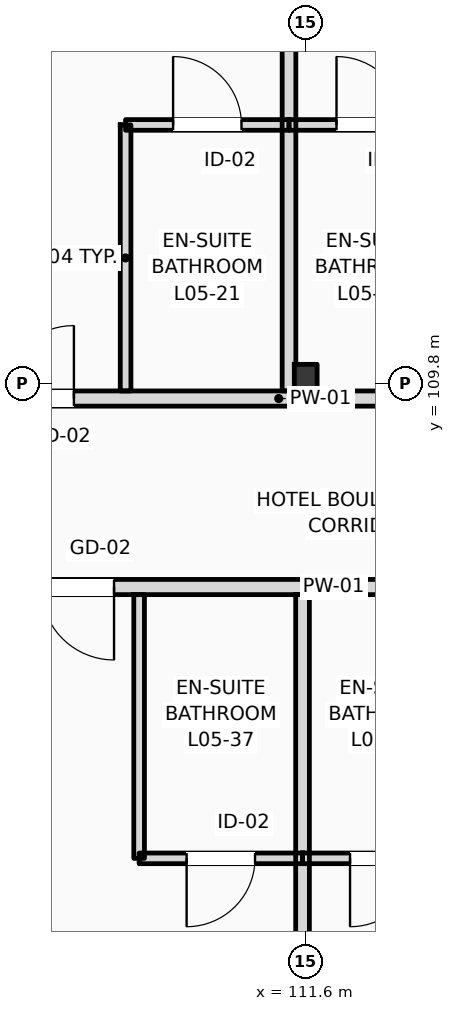
"""IFC4 building model, lengths in metres.
Left out: names, types, materials, properties, quantities, classifications, styles, units other than length and angle.
Written with IfcOpenShell. Run it as: python <this file> out.ifc"""

import sys

from ifc_helpers import new_model, si_unit, direction, frame, frame_2d, origin, origin_2d, place, context, subcontext, project, spatial, rectangle, i_section, extrude, element, fill, save


model = new_model("IFC4")
c1 = context("Model", 3, precision=1e-05, world=origin(), true_north=direction((0.0, 1.0)))
c2 = subcontext(c1, "Body", "Model", "MODEL_VIEW")
j1 = project(units=[si_unit("LENGTHUNIT", "METRE"), si_unit("PLANEANGLEUNIT", "RADIAN")], contexts=[c1])
p1 = place(None, origin())
s1 = spatial("IfcSite", under=j1, at=p1, CompositionType="ELEMENT")
p2 = place(p1, origin())
s2 = spatial("IfcBuilding", under=s1, at=p2, CompositionType="ELEMENT")
p3 = place(p2, frame((0.0, 0.0, 24.6)))
s3 = spatial("IfcBuildingStorey", under=s2, at=p3, CompositionType="ELEMENT", Elevation=24.6)
p4 = place(p3, frame((111.6, 109.8, 0.0), z_axis=(0.0, 0.0, 1.0), x_axis=(1.0, 0.0, 0.0)))
e1 = element("IfcColumn", 1, at=p4, inside=s3, PredefinedType="COLUMN", context=c2, shape_type="SweptSolid", body=[
    extrude(i_section(OverallWidth=0.3, OverallDepth=0.5, WebThickness=0.014, FlangeThickness=0.028, FilletRadius=0.027, at=origin_2d()), origin(), (0.0, 0.0, 1.0), 3.6),
])
p5 = place(p3, frame((10.65, 109.6, 0.0), z_axis=(0.0, 0.0, 1.0), x_axis=(1.0, 0.0, 0.0)))
e2 = element("IfcWall", 2, at=p5, inside=s3, PredefinedType="PARTITIONING", context=c2, shape_type="SweptSolid", body=[
    extrude(rectangle(XDim=109.21, YDim=0.2, at=frame_2d((54.605, 0.0))), origin(), (0.0, 0.0, 1.0), 2.78),
])
p6 = place(p5, frame((12.705, 0.0, 0.0)))
e3 = element("IfcOpeningElement", 3, at=p6, cuts=e2, PredefinedType="OPENING", context=c2, shape_type="SweptSolid", body=[
    extrude(rectangle(XDim=1.02, YDim=2.2, at=frame_2d((0.51, 1.1))), frame((0.0, 0.11, 0.0), z_axis=(0.0, -1.0, 0.0), x_axis=(1.0, 0.0, 0.0)), (0.0, 0.0, 1.0), 0.22),
])
p7 = place(p5, frame((19.26, 0.0, 0.0)))
e4 = element("IfcOpeningElement", 4, at=p7, cuts=e2, PredefinedType="OPENING", context=c2, shape_type="SweptSolid", body=[
    extrude(rectangle(XDim=1.02, YDim=2.2, at=frame_2d((0.51, 1.1))), frame((0.0, 0.11, 0.0), z_axis=(0.0, -1.0, 0.0), x_axis=(1.0, 0.0, 0.0)), (0.0, 0.0, 1.0), 0.22),
])
p8 = place(p5, frame((23.71, 0.0, 0.0)))
e5 = element("IfcOpeningElement", 5, at=p8, cuts=e2, PredefinedType="OPENING", context=c2, shape_type="SweptSolid", body=[
    extrude(rectangle(XDim=1.02, YDim=2.2, at=frame_2d((0.51, 1.1))), frame((0.0, 0.11, 0.0), z_axis=(0.0, -1.0, 0.0), x_axis=(1.0, 0.0, 0.0)), (0.0, 0.0, 1.0), 0.22),
])
p9 = place(p5, frame((27.66, 0.0, 0.0)))
e6 = element("IfcOpeningElement", 6, at=p9, cuts=e2, PredefinedType="OPENING", context=c2, shape_type="SweptSolid", body=[
    extrude(rectangle(XDim=1.02, YDim=2.2, at=frame_2d((0.51, 1.1))), frame((0.0, 0.11, 0.0), z_axis=(0.0, -1.0, 0.0), x_axis=(1.0, 0.0, 0.0)), (0.0, 0.0, 1.0), 0.22),
])
p10 = place(p5, frame((31.89, 0.0, 0.0)))
e7 = element("IfcOpeningElement", 7, at=p10, cuts=e2, PredefinedType="OPENING", context=c2, shape_type="SweptSolid", body=[
    extrude(rectangle(XDim=0.96, YDim=2.2, at=frame_2d((0.48, 1.1))), frame((0.0, 0.11, 0.0), z_axis=(0.0, -1.0, 0.0), x_axis=(1.0, 0.0, 0.0)), (0.0, 0.0, 1.0), 0.22),
])
p11 = place(p5, frame((33.94, 0.0, 0.0)))
e8 = element("IfcOpeningElement", 8, at=p11, cuts=e2, PredefinedType="OPENING", context=c2, shape_type="SweptSolid", body=[
    extrude(rectangle(XDim=0.96, YDim=2.2, at=frame_2d((0.48, 1.1))), frame((0.0, 0.11, 0.0), z_axis=(0.0, -1.0, 0.0), x_axis=(1.0, 0.0, 0.0)), (0.0, 0.0, 1.0), 0.22),
])
p12 = place(p5, frame((40.29, 0.0, 0.0)))
e9 = element("IfcOpeningElement", 9, at=p12, cuts=e2, PredefinedType="OPENING", context=c2, shape_type="SweptSolid", body=[
    extrude(rectangle(XDim=0.96, YDim=2.2, at=frame_2d((0.48, 1.1))), frame((0.0, 0.11, 0.0), z_axis=(0.0, -1.0, 0.0), x_axis=(1.0, 0.0, 0.0)), (0.0, 0.0, 1.0), 0.22),
])
p13 = place(p5, frame((42.34, 0.0, 0.0)))
e10 = element("IfcOpeningElement", 10, at=p13, cuts=e2, PredefinedType="OPENING", context=c2, shape_type="SweptSolid", body=[
    extrude(rectangle(XDim=0.96, YDim=2.2, at=frame_2d((0.48, 1.1))), frame((0.0, 0.11, 0.0), z_axis=(0.0, -1.0, 0.0), x_axis=(1.0, 0.0, 0.0)), (0.0, 0.0, 1.0), 0.22),
])
p14 = place(p5, frame((48.69, 0.0, 0.0)))
e11 = element("IfcOpeningElement", 11, at=p14, cuts=e2, PredefinedType="OPENING", context=c2, shape_type="SweptSolid", body=[
    extrude(rectangle(XDim=0.96, YDim=2.2, at=frame_2d((0.48, 1.1))), frame((0.0, 0.11, 0.0), z_axis=(0.0, -1.0, 0.0), x_axis=(1.0, 0.0, 0.0)), (0.0, 0.0, 1.0), 0.22),
])
p15 = place(p5, frame((50.74, 0.0, 0.0)))
e12 = element("IfcOpeningElement", 12, at=p15, cuts=e2, PredefinedType="OPENING", context=c2, shape_type="SweptSolid", body=[
    extrude(rectangle(XDim=0.96, YDim=2.2, at=frame_2d((0.48, 1.1))), frame((0.0, 0.11, 0.0), z_axis=(0.0, -1.0, 0.0), x_axis=(1.0, 0.0, 0.0)), (0.0, 0.0, 1.0), 0.22),
])
p16 = place(p5, frame((57.09, 0.0, 0.0)))
e13 = element("IfcOpeningElement", 13, at=p16, cuts=e2, PredefinedType="OPENING", context=c2, shape_type="SweptSolid", body=[
    extrude(rectangle(XDim=0.96, YDim=2.2, at=frame_2d((0.48, 1.1))), frame((0.0, 0.11, 0.0), z_axis=(0.0, -1.0, 0.0), x_axis=(1.0, 0.0, 0.0)), (0.0, 0.0, 1.0), 0.22),
])
p17 = place(p5, frame((59.14, 0.0, 0.0)))
e14 = element("IfcOpeningElement", 14, at=p17, cuts=e2, PredefinedType="OPENING", context=c2, shape_type="SweptSolid", body=[
    extrude(rectangle(XDim=0.96, YDim=2.2, at=frame_2d((0.48, 1.1))), frame((0.0, 0.11, 0.0), z_axis=(0.0, -1.0, 0.0), x_axis=(1.0, 0.0, 0.0)), (0.0, 0.0, 1.0), 0.22),
])
p18 = place(p5, frame((65.49, 0.0, 0.0)))
e15 = element("IfcOpeningElement", 15, at=p18, cuts=e2, PredefinedType="OPENING", context=c2, shape_type="SweptSolid", body=[
    extrude(rectangle(XDim=0.96, YDim=2.2, at=frame_2d((0.48, 1.1))), frame((0.0, 0.11, 0.0), z_axis=(0.0, -1.0, 0.0), x_axis=(1.0, 0.0, 0.0)), (0.0, 0.0, 1.0), 0.22),
])
p19 = place(p5, frame((67.54, 0.0, 0.0)))
e16 = element("IfcOpeningElement", 16, at=p19, cuts=e2, PredefinedType="OPENING", context=c2, shape_type="SweptSolid", body=[
    extrude(rectangle(XDim=0.96, YDim=2.2, at=frame_2d((0.48, 1.1))), frame((0.0, 0.11, 0.0), z_axis=(0.0, -1.0, 0.0), x_axis=(1.0, 0.0, 0.0)), (0.0, 0.0, 1.0), 0.22),
])
p20 = place(p5, frame((73.89, 0.0, 0.0)))
e17 = element("IfcOpeningElement", 17, at=p20, cuts=e2, PredefinedType="OPENING", context=c2, shape_type="SweptSolid", body=[
    extrude(rectangle(XDim=0.96, YDim=2.2, at=frame_2d((0.48, 1.1))), frame((0.0, 0.11, 0.0), z_axis=(0.0, -1.0, 0.0), x_axis=(1.0, 0.0, 0.0)), (0.0, 0.0, 1.0), 0.22),
])
p21 = place(p5, frame((78.09, 0.0, 0.0)))
e18 = element("IfcOpeningElement", 18, at=p21, cuts=e2, PredefinedType="OPENING", context=c2, shape_type="SweptSolid", body=[
    extrude(rectangle(XDim=0.96, YDim=2.2, at=frame_2d((0.48, 1.1))), frame((0.0, 0.11, 0.0), z_axis=(0.0, -1.0, 0.0), x_axis=(1.0, 0.0, 0.0)), (0.0, 0.0, 1.0), 0.22),
])
p22 = place(p5, frame((82.29, 0.0, 0.0)))
e19 = element("IfcOpeningElement", 19, at=p22, cuts=e2, PredefinedType="OPENING", context=c2, shape_type="SweptSolid", body=[
    extrude(rectangle(XDim=0.96, YDim=2.2, at=frame_2d((0.48, 1.1))), frame((0.0, 0.11, 0.0), z_axis=(0.0, -1.0, 0.0), x_axis=(1.0, 0.0, 0.0)), (0.0, 0.0, 1.0), 0.22),
])
p23 = place(p5, frame((86.49, 0.0, 0.0)))
e20 = element("IfcOpeningElement", 20, at=p23, cuts=e2, PredefinedType="OPENING", context=c2, shape_type="SweptSolid", body=[
    extrude(rectangle(XDim=0.96, YDim=2.2, at=frame_2d((0.48, 1.1))), frame((0.0, 0.11, 0.0), z_axis=(0.0, -1.0, 0.0), x_axis=(1.0, 0.0, 0.0)), (0.0, 0.0, 1.0), 0.22),
])
p24 = place(p5, frame((88.54, 0.0, 0.0)))
e21 = element("IfcOpeningElement", 21, at=p24, cuts=e2, PredefinedType="OPENING", context=c2, shape_type="SweptSolid", body=[
    extrude(rectangle(XDim=0.96, YDim=2.2, at=frame_2d((0.48, 1.1))), frame((0.0, 0.11, 0.0), z_axis=(0.0, -1.0, 0.0), x_axis=(1.0, 0.0, 0.0)), (0.0, 0.0, 1.0), 0.22),
])
p25 = place(p5, frame((94.89, 0.0, 0.0)))
e22 = element("IfcOpeningElement", 22, at=p25, cuts=e2, PredefinedType="OPENING", context=c2, shape_type="SweptSolid", body=[
    extrude(rectangle(XDim=0.96, YDim=2.2, at=frame_2d((0.48, 1.1))), frame((0.0, 0.11, 0.0), z_axis=(0.0, -1.0, 0.0), x_axis=(1.0, 0.0, 0.0)), (0.0, 0.0, 1.0), 0.22),
])
p26 = place(p5, frame((96.94, 0.0, 0.0)))
e23 = element("IfcOpeningElement", 23, at=p26, cuts=e2, PredefinedType="OPENING", context=c2, shape_type="SweptSolid", body=[
    extrude(rectangle(XDim=0.96, YDim=2.2, at=frame_2d((0.48, 1.1))), frame((0.0, 0.11, 0.0), z_axis=(0.0, -1.0, 0.0), x_axis=(1.0, 0.0, 0.0)), (0.0, 0.0, 1.0), 0.22),
])
p27 = place(p5, frame((103.29, 0.0, 0.0)))
e24 = element("IfcOpeningElement", 24, at=p27, cuts=e2, PredefinedType="OPENING", context=c2, shape_type="SweptSolid", body=[
    extrude(rectangle(XDim=0.96, YDim=2.2, at=frame_2d((0.48, 1.1))), frame((0.0, 0.11, 0.0), z_axis=(0.0, -1.0, 0.0), x_axis=(1.0, 0.0, 0.0)), (0.0, 0.0, 1.0), 0.22),
])
p28 = place(p5, frame((105.25, 0.0, 0.0)))
e25 = element("IfcOpeningElement", 25, at=p28, cuts=e2, PredefinedType="OPENING", context=c2, shape_type="SweptSolid", body=[
    extrude(rectangle(XDim=0.96, YDim=2.2, at=frame_2d((0.48, 1.1))), frame((0.0, 0.11, 0.0), z_axis=(0.0, -1.0, 0.0), x_axis=(1.0, 0.0, 0.0)), (0.0, 0.0, 1.0), 0.22),
])
p29 = place(p5, frame((2.716, 0.0, 0.0)))
e26 = element("IfcOpeningElement", 26, at=p29, cuts=e2, PredefinedType="OPENING", context=c2, shape_type="SweptSolid", body=[
    extrude(rectangle(XDim=1.35, YDim=2.25, at=frame_2d((0.675, 1.125))), frame((0.0, 0.11, 0.0), z_axis=(0.0, -1.0, 0.0), x_axis=(1.0, 0.0, 0.0)), (0.0, 0.0, 1.0), 0.22),
])
p30 = place(p5, frame((6.65, 0.0, 0.0)))
e27 = element("IfcOpeningElement", 27, at=p30, cuts=e2, PredefinedType="OPENING", context=c2, shape_type="SweptSolid", body=[
    extrude(rectangle(XDim=1.35, YDim=2.25, at=frame_2d((0.675, 1.125))), frame((0.0, 0.11, 0.0), z_axis=(0.0, -1.0, 0.0), x_axis=(1.0, 0.0, 0.0)), (0.0, 0.0, 1.0), 0.22),
])
p31 = place(p5, frame((10.583, 0.0, 0.0)))
e28 = element("IfcOpeningElement", 28, at=p31, cuts=e2, PredefinedType="OPENING", context=c2, shape_type="SweptSolid", body=[
    extrude(rectangle(XDim=1.35, YDim=2.25, at=frame_2d((0.675, 1.125))), frame((0.0, 0.11, 0.0), z_axis=(0.0, -1.0, 0.0), x_axis=(1.0, 0.0, 0.0)), (0.0, 0.0, 1.0), 0.22),
])
p32 = place(p3, frame((79.76, 107.12, 0.0), z_axis=(0.0, 0.0, 1.0), x_axis=(1.0, 0.0, 0.0)))
e29 = element("IfcWall", 29, at=p32, inside=s3, PredefinedType="PARTITIONING", context=c2, shape_type="SweptSolid", body=[
    extrude(rectangle(XDim=40.1, YDim=0.2, at=frame_2d((20.05, 0.0))), origin(), (0.0, 0.0, 1.0), 3.34),
])
p33 = place(p32, frame((2.65, 0.0, 0.0)))
e30 = element("IfcOpeningElement", 30, at=p33, cuts=e29, PredefinedType="OPENING", context=c2, shape_type="SweptSolid", body=[
    extrude(rectangle(XDim=0.96, YDim=2.2, at=frame_2d((0.48, 1.1))), frame((0.0, 0.11, 0.0), z_axis=(0.0, -1.0, 0.0), x_axis=(1.0, 0.0, 0.0)), (0.0, 0.0, 1.0), 0.22),
])
p34 = place(p32, frame((4.448, 0.0, 0.0)))
e31 = element("IfcOpeningElement", 31, at=p34, cuts=e29, PredefinedType="OPENING", context=c2, shape_type="SweptSolid", body=[
    extrude(rectangle(XDim=0.96, YDim=2.2, at=frame_2d((0.48, 1.1))), frame((0.0, 0.11, 0.0), z_axis=(0.0, -1.0, 0.0), x_axis=(1.0, 0.0, 0.0)), (0.0, 0.0, 1.0), 0.22),
])
p35 = place(p32, frame((10.583, 0.0, 0.0)))
e32 = element("IfcOpeningElement", 32, at=p35, cuts=e29, PredefinedType="OPENING", context=c2, shape_type="SweptSolid", body=[
    extrude(rectangle(XDim=0.96, YDim=2.2, at=frame_2d((0.48, 1.1))), frame((0.0, 0.11, 0.0), z_axis=(0.0, -1.0, 0.0), x_axis=(1.0, 0.0, 0.0)), (0.0, 0.0, 1.0), 0.22),
])
p36 = place(p32, frame((12.418, 0.0, 0.0)))
e33 = element("IfcOpeningElement", 33, at=p36, cuts=e29, PredefinedType="OPENING", context=c2, shape_type="SweptSolid", body=[
    extrude(rectangle(XDim=0.96, YDim=2.2, at=frame_2d((0.48, 1.1))), frame((0.0, 0.11, 0.0), z_axis=(0.0, -1.0, 0.0), x_axis=(1.0, 0.0, 0.0)), (0.0, 0.0, 1.0), 0.22),
])
p37 = place(p32, frame((18.553, 0.0, 0.0)))
e34 = element("IfcOpeningElement", 34, at=p37, cuts=e29, PredefinedType="OPENING", context=c2, shape_type="SweptSolid", body=[
    extrude(rectangle(XDim=0.96, YDim=2.2, at=frame_2d((0.48, 1.1))), frame((0.0, 0.11, 0.0), z_axis=(0.0, -1.0, 0.0), x_axis=(1.0, 0.0, 0.0)), (0.0, 0.0, 1.0), 0.22),
])
p38 = place(p32, frame((20.388, 0.0, 0.0)))
e35 = element("IfcOpeningElement", 35, at=p38, cuts=e29, PredefinedType="OPENING", context=c2, shape_type="SweptSolid", body=[
    extrude(rectangle(XDim=0.96, YDim=2.2, at=frame_2d((0.48, 1.1))), frame((0.0, 0.11, 0.0), z_axis=(0.0, -1.0, 0.0), x_axis=(1.0, 0.0, 0.0)), (0.0, 0.0, 1.0), 0.22),
])
p39 = place(p32, frame((26.523, 0.0, 0.0)))
e36 = element("IfcOpeningElement", 36, at=p39, cuts=e29, PredefinedType="OPENING", context=c2, shape_type="SweptSolid", body=[
    extrude(rectangle(XDim=0.96, YDim=2.2, at=frame_2d((0.48, 1.1))), frame((0.0, 0.11, 0.0), z_axis=(0.0, -1.0, 0.0), x_axis=(1.0, 0.0, 0.0)), (0.0, 0.0, 1.0), 0.22),
])
p40 = place(p32, frame((28.358, 0.0, 0.0)))
e37 = element("IfcOpeningElement", 37, at=p40, cuts=e29, PredefinedType="OPENING", context=c2, shape_type="SweptSolid", body=[
    extrude(rectangle(XDim=0.96, YDim=2.2, at=frame_2d((0.48, 1.1))), frame((0.0, 0.11, 0.0), z_axis=(0.0, -1.0, 0.0), x_axis=(1.0, 0.0, 0.0)), (0.0, 0.0, 1.0), 0.22),
])
p41 = place(p32, frame((34.493, 0.0, 0.0)))
e38 = element("IfcOpeningElement", 38, at=p41, cuts=e29, PredefinedType="OPENING", context=c2, shape_type="SweptSolid", body=[
    extrude(rectangle(XDim=0.96, YDim=2.2, at=frame_2d((0.48, 1.1))), frame((0.0, 0.11, 0.0), z_axis=(0.0, -1.0, 0.0), x_axis=(1.0, 0.0, 0.0)), (0.0, 0.0, 1.0), 0.22),
])
p42 = place(p32, frame((36.364, 0.0, 0.0)))
e39 = element("IfcOpeningElement", 39, at=p42, cuts=e29, PredefinedType="OPENING", context=c2, shape_type="SweptSolid", body=[
    extrude(rectangle(XDim=0.96, YDim=2.2, at=frame_2d((0.48, 1.1))), frame((0.0, 0.11, 0.0), z_axis=(0.0, -1.0, 0.0), x_axis=(1.0, 0.0, 0.0)), (0.0, 0.0, 1.0), 0.22),
])
p43 = place(p3, frame((111.38, 109.7, 0.0), z_axis=(0.0, 0.0, 1.0), x_axis=(0.0, 1.0, 0.0)))
e40 = element("IfcWall", 40, at=p43, inside=s3, PredefinedType="PARTITIONING", context=c2, shape_type="SweptSolid", body=[
    extrude(rectangle(XDim=8.15, YDim=0.18, at=frame_2d((4.075, 0.0))), origin(), (0.0, 0.0, 1.0), 2.93),
])
p44 = place(p3, frame((109.23, 109.7, 0.0), z_axis=(0.0, 0.0, 1.0), x_axis=(0.0, 1.0, 0.0)))
e41 = element("IfcWall", 41, at=p44, inside=s3, PredefinedType="PARTITIONING", context=c2, shape_type="SweptSolid", body=[
    extrude(rectangle(XDim=3.5, YDim=0.14, at=frame_2d((1.75, 0.0))), origin(), (0.0, 0.0, 1.0), 3.34),
])
p45 = place(p3, frame((109.23, 113.2, 0.0), z_axis=(0.0, 0.0, 1.0), x_axis=(1.0, 0.0, 0.0)))
e42 = element("IfcWall", 42, at=p45, inside=s3, PredefinedType="PARTITIONING", context=c2, shape_type="SweptSolid", body=[
    extrude(rectangle(XDim=2.15, YDim=0.14, at=frame_2d((1.075, 0.0))), origin(), (0.0, 0.0, 1.0), 3.34),
])
p46 = place(p45, frame((0.625, 0.0, 0.0)))
e43 = element("IfcOpeningElement", 43, at=p46, cuts=e42, PredefinedType="OPENING", context=c2, shape_type="SweptSolid", body=[
    extrude(rectangle(XDim=0.9, YDim=2.1, at=frame_2d((0.45, 1.05))), frame((0.0, 0.08, 0.0), z_axis=(0.0, -1.0, 0.0), x_axis=(1.0, 0.0, 0.0)), (0.0, 0.0, 1.0), 0.16),
])
p47 = place(p3, frame((111.38, 113.2, 0.0), z_axis=(0.0, 0.0, 1.0), x_axis=(1.0, 0.0, 0.0)))
e44 = element("IfcWall", 44, at=p47, inside=s3, PredefinedType="PARTITIONING", context=c2, shape_type="SweptSolid", body=[
    extrude(rectangle(XDim=2.15, YDim=0.14, at=frame_2d((1.075, 0.0))), origin(), (0.0, 0.0, 1.0), 3.34),
])
p48 = place(p47, frame((0.625, 0.0, 0.0)))
e45 = element("IfcOpeningElement", 45, at=p48, cuts=e44, PredefinedType="OPENING", context=c2, shape_type="SweptSolid", body=[
    extrude(rectangle(XDim=0.9, YDim=2.1, at=frame_2d((0.45, 1.05))), frame((0.0, 0.08, 0.0), z_axis=(0.0, -1.0, 0.0), x_axis=(1.0, 0.0, 0.0)), (0.0, 0.0, 1.0), 0.16),
])
p49 = place(p3, frame((111.558, 96.14, 0.0), z_axis=(0.0, 0.0, 1.0), x_axis=(0.0, 1.0, 0.0)))
e46 = element("IfcWall", 46, at=p49, inside=s3, PredefinedType="PARTITIONING", context=c2, shape_type="SweptSolid", body=[
    extrude(rectangle(XDim=10.88, YDim=0.18, at=frame_2d((5.44, 0.0))), origin(), (0.0, 0.0, 1.0), 2.93),
])
p50 = place(p3, frame((109.408, 103.55, 0.0), z_axis=(0.0, 0.0, 1.0), x_axis=(0.0, 1.0, 0.0)))
e47 = element("IfcWall", 47, at=p50, inside=s3, PredefinedType="PARTITIONING", context=c2, shape_type="SweptSolid", body=[
    extrude(rectangle(XDim=3.47, YDim=0.14, at=frame_2d((1.735, 0.0))), origin(), (0.0, 0.0, 1.0), 3.34),
])
p51 = place(p3, frame((109.408, 103.55, 0.0), z_axis=(0.0, 0.0, 1.0), x_axis=(1.0, 0.0, 0.0)))
e48 = element("IfcWall", 48, at=p51, inside=s3, PredefinedType="PARTITIONING", context=c2, shape_type="SweptSolid", body=[
    extrude(rectangle(XDim=2.15, YDim=0.14, at=frame_2d((1.075, 0.0))), origin(), (0.0, 0.0, 1.0), 3.34),
])
p52 = place(p51, frame((0.625, 0.0, 0.0)))
e49 = element("IfcOpeningElement", 49, at=p52, cuts=e48, PredefinedType="OPENING", context=c2, shape_type="SweptSolid", body=[
    extrude(rectangle(XDim=0.9, YDim=2.1, at=frame_2d((0.45, 1.05))), frame((0.0, 0.08, 0.0), z_axis=(0.0, -1.0, 0.0), x_axis=(1.0, 0.0, 0.0)), (0.0, 0.0, 1.0), 0.16),
])
p53 = place(p3, frame((111.558, 103.55, 0.0), z_axis=(0.0, 0.0, 1.0), x_axis=(1.0, 0.0, 0.0)))
e50 = element("IfcWall", 50, at=p53, inside=s3, PredefinedType="PARTITIONING", context=c2, shape_type="SweptSolid", body=[
    extrude(rectangle(XDim=2.15, YDim=0.14, at=frame_2d((1.075, 0.0))), origin(), (0.0, 0.0, 1.0), 3.34),
])
p54 = place(p53, frame((0.625, 0.0, 0.0)))
e51 = element("IfcOpeningElement", 51, at=p54, cuts=e50, PredefinedType="OPENING", context=c2, shape_type="SweptSolid", body=[
    extrude(rectangle(XDim=0.9, YDim=2.1, at=frame_2d((0.45, 1.05))), frame((0.0, 0.08, 0.0), z_axis=(0.0, -1.0, 0.0), x_axis=(1.0, 0.0, 0.0)), (0.0, 0.0, 1.0), 0.16),
])
p55 = place(p26, origin())
e52 = element("IfcDoor", 52, at=p55, inside=s3, OperationType="SINGLE_SWING_RIGHT", PredefinedType="DOOR", context=c2, shape_type="SweptSolid", body=[
    extrude(rectangle(XDim=0.96, YDim=2.2, at=frame_2d((0.48, 1.1))), frame((0.0, 0.025, 0.0), z_axis=(0.0, -1.0, 0.0), x_axis=(1.0, 0.0, 0.0)), (0.0, 0.0, 1.0), 0.05),
])
fill(e23, e52)
p56 = place(p46, origin())
e53 = element("IfcDoor", 53, at=p56, inside=s3, OperationType="SINGLE_SWING_LEFT", PredefinedType="DOOR", context=c2, shape_type="SweptSolid", body=[
    extrude(rectangle(XDim=0.9, YDim=2.1, at=frame_2d((0.45, 1.05))), frame((0.0, 0.025, 0.0), z_axis=(0.0, -1.0, 0.0), x_axis=(1.0, 0.0, 0.0)), (0.0, 0.0, 1.0), 0.05),
])
fill(e43, e53)
p57 = place(p48, origin())
e54 = element("IfcDoor", 54, at=p57, inside=s3, OperationType="SINGLE_SWING_LEFT", PredefinedType="DOOR", context=c2, shape_type="SweptSolid", body=[
    extrude(rectangle(XDim=0.9, YDim=2.1, at=frame_2d((0.45, 1.05))), frame((0.0, 0.025, 0.0), z_axis=(0.0, -1.0, 0.0), x_axis=(1.0, 0.0, 0.0)), (0.0, 0.0, 1.0), 0.05),
])
fill(e45, e54)
p58 = place(p40, frame((0.96, 0.0, 0.0), z_axis=(0.0, 0.0, 1.0), x_axis=(-1.0, 0.0, 0.0)))
e55 = element("IfcDoor", 55, at=p58, inside=s3, OperationType="SINGLE_SWING_RIGHT", PredefinedType="DOOR", context=c2, shape_type="SweptSolid", body=[
    extrude(rectangle(XDim=0.96, YDim=2.2, at=frame_2d((0.48, 1.1))), frame((0.0, 0.025, 0.0), z_axis=(0.0, -1.0, 0.0), x_axis=(1.0, 0.0, 0.0)), (0.0, 0.0, 1.0), 0.05),
])
fill(e37, e55)
p59 = place(p52, frame((0.9, 0.0, 0.0), z_axis=(0.0, 0.0, 1.0), x_axis=(-1.0, 0.0, 0.0)))
e56 = element("IfcDoor", 56, at=p59, inside=s3, OperationType="SINGLE_SWING_LEFT", PredefinedType="DOOR", context=c2, shape_type="SweptSolid", body=[
    extrude(rectangle(XDim=0.9, YDim=2.1, at=frame_2d((0.45, 1.05))), frame((0.0, 0.025, 0.0), z_axis=(0.0, -1.0, 0.0), x_axis=(1.0, 0.0, 0.0)), (0.0, 0.0, 1.0), 0.05),
])
fill(e49, e56)
p60 = place(p54, frame((0.9, 0.0, 0.0), z_axis=(0.0, 0.0, 1.0), x_axis=(-1.0, 0.0, 0.0)))
e57 = element("IfcDoor", 57, at=p60, inside=s3, OperationType="SINGLE_SWING_LEFT", PredefinedType="DOOR", context=c2, shape_type="SweptSolid", body=[
    extrude(rectangle(XDim=0.9, YDim=2.1, at=frame_2d((0.45, 1.05))), frame((0.0, 0.025, 0.0), z_axis=(0.0, -1.0, 0.0), x_axis=(1.0, 0.0, 0.0)), (0.0, 0.0, 1.0), 0.05),
])
fill(e51, e57)
save(model, sys.argv[1])
